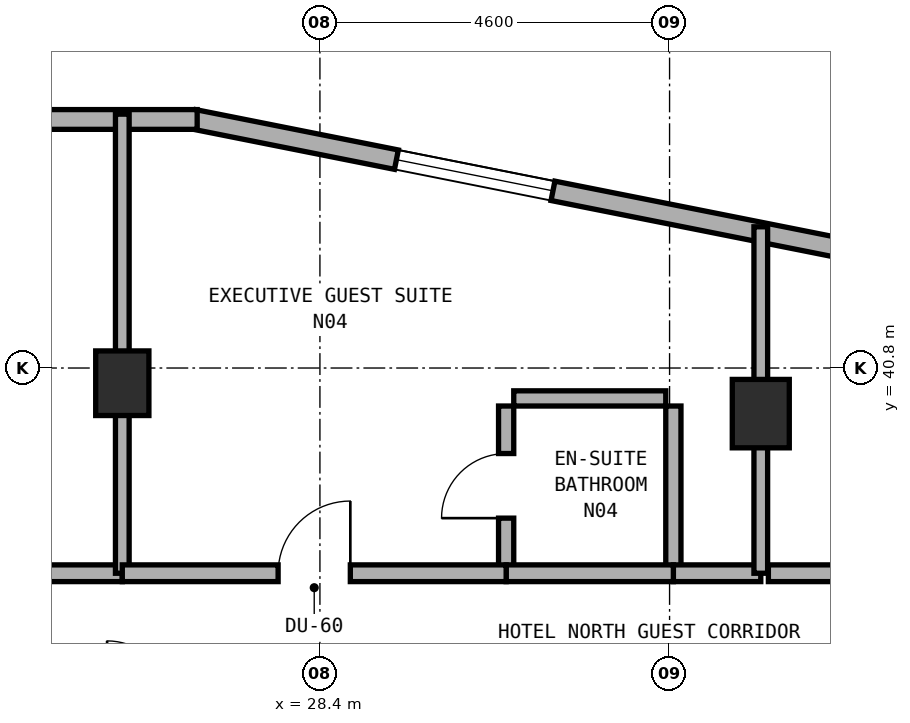
"""IFC4 building model, lengths in metres.
Left out: names, types, materials, properties, quantities, classifications, styles, units other than length and angle.
Written with IfcOpenShell. Run it as: python <this file> out.ifc"""

import sys

from ifc_helpers import new_model, si_unit, direction, frame, frame_2d, origin, origin_2d, place, context, subcontext, project, spatial, rectangle, extrude, element, fill, save


model = new_model("IFC4")
c1 = context("Model", 3, precision=1e-05, world=origin(), true_north=direction((0.0, 1.0)))
c2 = subcontext(c1, "Body", "Model", "MODEL_VIEW")
j1 = project(units=[si_unit("LENGTHUNIT", "METRE"), si_unit("PLANEANGLEUNIT", "RADIAN")], contexts=[c1])
p1 = place(None, origin())
s1 = spatial("IfcSite", under=j1, at=p1, CompositionType="ELEMENT")
p2 = place(p1, origin())
s2 = spatial("IfcBuilding", under=s1, at=p2, CompositionType="ELEMENT")
p3 = place(p2, frame((0.0, 0.0, 220.7)))
s3 = spatial("IfcBuildingStorey", under=s2, at=p3, CompositionType="ELEMENT", Elevation=220.7)
p4 = place(p3, frame((25.8, 40.6, 0.0), z_axis=(0.0, 0.0, 1.0), x_axis=(1.0, 0.0, 0.0)))
e1 = element("IfcColumn", 1, at=p4, inside=s3, PredefinedType="COLUMN", context=c2, shape_type="SweptSolid", body=[
    extrude(rectangle(XDim=0.7, YDim=0.85, at=origin_2d()), origin(), (0.0, 0.0, 1.0), 3.6),
])
p5 = place(p3, frame((34.2, 40.2, 0.0), z_axis=(0.0, 0.0, 1.0), x_axis=(1.0, 0.0, 0.0)))
e2 = element("IfcColumn", 2, at=p5, inside=s3, PredefinedType="COLUMN", context=c2, shape_type="SweptSolid", body=[
    extrude(rectangle(XDim=0.75, YDim=0.9, at=origin_2d()), origin(), (0.0, 0.0, 1.0), 3.6),
])
p6 = place(p3, frame((35.283, 42.371, 0.0), z_axis=(0.0, 0.0, 1.0), x_axis=(-0.980748582507, 0.1952747242, 0.0)))
e3 = element("IfcWall", 3, at=p6, inside=s3, PredefinedType="STANDARD", context=c2, shape_type="SweptSolid", body=[
    extrude(rectangle(XDim=8.705, YDim=0.26, at=frame_2d((4.353, 0.0))), origin(), (0.0, 0.0, 1.0), 3.32),
])
p7 = place(p6, frame((3.892, 0.0, 0.85)))
e4 = element("IfcOpeningElement", 4, at=p7, cuts=e3, PredefinedType="OPENING", context=c2, shape_type="SweptSolid", body=[
    extrude(rectangle(XDim=2.1, YDim=1.5, at=frame_2d((1.05, 0.75))), frame((0.0, 0.14, 0.0), z_axis=(0.0, -1.0, 0.0), x_axis=(1.0, 0.0, 0.0)), (0.0, 0.0, 1.0), 0.28),
])
p8 = place(p3, frame((26.785, 44.07, 0.0), z_axis=(0.0, 0.0, 1.0), x_axis=(-1.0, 0.0, 0.0)))
e5 = element("IfcWall", 5, at=p8, inside=s3, PredefinedType="STANDARD", context=c2, shape_type="SweptSolid", body=[
    extrude(rectangle(XDim=11.535, YDim=0.26, at=frame_2d((5.768, 0.0))), origin(), (0.0, 0.0, 1.0), 3.32),
])
p9 = place(p8, frame((5.185, 0.0, 0.0)))
e6 = element("IfcOpeningElement", 6, at=p9, cuts=e5, PredefinedType="OPENING", context=c2, shape_type="SweptSolid", body=[
    extrude(rectangle(XDim=1.2, YDim=2.15, at=frame_2d((0.6, 1.075))), frame((0.0, 0.14, 0.0), z_axis=(0.0, -1.0, 0.0), x_axis=(1.0, 0.0, 0.0)), (0.0, 0.0, 1.0), 0.28),
])
p10 = place(p8, frame((1.96, 0.0, 0.85)))
e7 = element("IfcOpeningElement", 7, at=p10, cuts=e5, PredefinedType="OPENING", context=c2, shape_type="SweptSolid", body=[
    extrude(rectangle(XDim=2.1, YDim=1.5, at=frame_2d((1.05, 0.75))), frame((0.0, 0.14, 0.0), z_axis=(0.0, -1.0, 0.0), x_axis=(1.0, 0.0, 0.0)), (0.0, 0.0, 1.0), 0.28),
])
p11 = place(p8, frame((7.51, 0.0, 0.85)))
e8 = element("IfcOpeningElement", 8, at=p11, cuts=e5, PredefinedType="OPENING", context=c2, shape_type="SweptSolid", body=[
    extrude(rectangle(XDim=2.1, YDim=1.5, at=frame_2d((1.05, 0.75))), frame((0.0, 0.14, 0.0), z_axis=(0.0, -1.0, 0.0), x_axis=(1.0, 0.0, 0.0)), (0.0, 0.0, 1.0), 0.28),
])
p12 = place(p3, frame((18.4, 38.1, 0.0), z_axis=(0.0, 0.0, 1.0), x_axis=(1.0, 0.0, 0.0)))
e9 = element("IfcWall", 9, at=p12, inside=s3, PredefinedType="SOLIDWALL", context=c2, shape_type="SweptSolid", body=[
    extrude(rectangle(XDim=7.4, YDim=0.22, at=frame_2d((3.7, 0.0))), origin(), (0.0, 0.0, 1.0), 2.695),
])
p13 = place(p12, frame((3.225, 0.0, 0.0)))
e10 = element("IfcOpeningElement", 10, at=p13, cuts=e9, PredefinedType="OPENING", context=c2, shape_type="SweptSolid", body=[
    extrude(rectangle(XDim=0.95, YDim=2.1, at=frame_2d((0.475, 1.05))), frame((0.0, 0.12, 0.0), z_axis=(0.0, -1.0, 0.0), x_axis=(1.0, 0.0, 0.0)), (0.0, 0.0, 1.0), 0.24),
])
p14 = place(p3, frame((25.8, 38.1, 0.0), z_axis=(0.0, 0.0, 1.0), x_axis=(0.0, 1.0, 0.0)))
e11 = element("IfcWall", 11, at=p14, inside=s3, PredefinedType="SOLIDWALL", context=c2, shape_type="SweptSolid", body=[
    extrude(rectangle(XDim=6.04, YDim=0.18, at=frame_2d((3.02, 0.0))), origin(), (0.0, 0.0, 1.0), 2.695),
])
p15 = place(p3, frame((30.85, 38.2, 0.0), z_axis=(0.0, 0.0, 1.0), x_axis=(0.0, 1.0, 0.0)))
e12 = element("IfcWall", 12, at=p15, inside=s3, PredefinedType="PLUMBINGWALL", context=c2, shape_type="SweptSolid", body=[
    extrude(rectangle(XDim=2.1, YDim=0.2, at=frame_2d((1.05, 0.0))), origin(), (0.0, 0.0, 1.0), 3.015),
])
p16 = place(p15, frame((0.625, 0.0, 0.0)))
e13 = element("IfcOpeningElement", 13, at=p16, cuts=e12, PredefinedType="OPENING", context=c2, shape_type="SweptSolid", body=[
    extrude(rectangle(XDim=0.85, YDim=2.1, at=frame_2d((0.425, 1.05))), frame((0.0, 0.11, 0.0), z_axis=(0.0, -1.0, 0.0), x_axis=(1.0, 0.0, 0.0)), (0.0, 0.0, 1.0), 0.22),
])
p17 = place(p3, frame((30.95, 40.4, 0.0), z_axis=(0.0, 0.0, 1.0), x_axis=(1.0, 0.0, 0.0)))
e14 = element("IfcWall", 14, at=p17, inside=s3, PredefinedType="PLUMBINGWALL", context=c2, shape_type="SweptSolid", body=[
    extrude(rectangle(XDim=2.0, YDim=0.2, at=frame_2d((1.0, 0.0))), origin(), (0.0, 0.0, 1.0), 3.015),
])
p18 = place(p3, frame((33.05, 38.2, 0.0), z_axis=(0.0, 0.0, 1.0), x_axis=(0.0, 1.0, 0.0)))
e15 = element("IfcWall", 15, at=p18, inside=s3, PredefinedType="PLUMBINGWALL", context=c2, shape_type="SweptSolid", body=[
    extrude(rectangle(XDim=2.1, YDim=0.2, at=frame_2d((1.05, 0.0))), origin(), (0.0, 0.0, 1.0), 3.015),
])
p19 = place(p3, frame((33.05, 38.1, 0.0), z_axis=(0.0, 0.0, 1.0), x_axis=(1.0, 0.0, 0.0)))
e16 = element("IfcWall", 16, at=p19, inside=s3, PredefinedType="SOLIDWALL", context=c2, shape_type="SweptSolid", body=[
    extrude(rectangle(XDim=1.15, YDim=0.22, at=frame_2d((0.575, 0.0))), origin(), (0.0, 0.0, 1.0), 2.695),
])
p20 = place(p3, frame((30.85, 38.1, 0.0), z_axis=(0.0, 0.0, 1.0), x_axis=(1.0, 0.0, 0.0)))
e17 = element("IfcWall", 17, at=p20, inside=s3, PredefinedType="SOLIDWALL", context=c2, shape_type="SweptSolid", body=[
    extrude(rectangle(XDim=2.2, YDim=0.22, at=frame_2d((1.1, 0.0))), origin(), (0.0, 0.0, 1.0), 3.32),
])
p21 = place(p3, frame((25.8, 38.1, 0.0), z_axis=(0.0, 0.0, 1.0), x_axis=(1.0, 0.0, 0.0)))
e18 = element("IfcWall", 18, at=p21, inside=s3, PredefinedType="SOLIDWALL", context=c2, shape_type="SweptSolid", body=[
    extrude(rectangle(XDim=5.05, YDim=0.22, at=frame_2d((2.525, 0.0))), origin(), (0.0, 0.0, 1.0), 2.695),
])
p22 = place(p21, frame((2.05, 0.0, 0.0)))
e19 = element("IfcOpeningElement", 19, at=p22, cuts=e18, PredefinedType="OPENING", context=c2, shape_type="SweptSolid", body=[
    extrude(rectangle(XDim=0.95, YDim=2.1, at=frame_2d((0.475, 1.05))), frame((0.0, 0.12, 0.0), z_axis=(0.0, -1.0, 0.0), x_axis=(1.0, 0.0, 0.0)), (0.0, 0.0, 1.0), 0.24),
])
p23 = place(p3, frame((34.2, 38.1, 0.0), z_axis=(0.0, 0.0, 1.0), x_axis=(0.0, 1.0, 0.0)))
e20 = element("IfcWall", 20, at=p23, inside=s3, PredefinedType="SOLIDWALL", context=c2, shape_type="SweptSolid", body=[
    extrude(rectangle(XDim=4.558, YDim=0.18, at=frame_2d((2.279, 0.0))), origin(), (0.0, 0.0, 1.0), 2.695),
])
p24 = place(p3, frame((34.3, 38.1, 0.0), z_axis=(0.0, 0.0, 1.0), x_axis=(1.0, 0.0, 0.0)))
e21 = element("IfcWall", 21, at=p24, inside=s3, PredefinedType="SOLIDWALL", context=c2, shape_type="SweptSolid", body=[
    extrude(rectangle(XDim=5.64, YDim=0.22, at=frame_2d((2.82, 0.0))), origin(), (0.0, 0.0, 1.0), 3.015),
])
p25 = place(p24, frame((2.1, 0.0, 0.0)))
e22 = element("IfcOpeningElement", 22, at=p25, cuts=e21, PredefinedType="OPENING", context=c2, shape_type="SweptSolid", body=[
    extrude(rectangle(XDim=0.95, YDim=2.1, at=frame_2d((0.475, 1.05))), frame((0.0, 0.12, 0.0), z_axis=(0.0, -1.0, 0.0), x_axis=(1.0, 0.0, 0.0)), (0.0, 0.0, 1.0), 0.24),
])
p26 = place(p7, origin())
e23 = element("IfcWindow", 23, at=p26, inside=s3, PartitioningType="SINGLE_PANEL", PredefinedType="WINDOW", context=c2, shape_type="SweptSolid", body=[
    extrude(rectangle(XDim=2.1, YDim=1.5, at=frame_2d((1.05, 0.75))), frame((0.0, 0.03, 0.0), z_axis=(0.0, -1.0, 0.0), x_axis=(1.0, 0.0, 0.0)), (0.0, 0.0, 1.0), 0.06),
])
fill(e4, e23)
p27 = place(p16, origin())
e24 = element("IfcDoor", 24, at=p27, inside=s3, OperationType="SINGLE_SWING_LEFT", PredefinedType="DOOR", context=c2, shape_type="SweptSolid", body=[
    extrude(rectangle(XDim=0.85, YDim=2.1, at=frame_2d((0.425, 1.05))), frame((0.0, 0.025, 0.0), z_axis=(0.0, -1.0, 0.0), x_axis=(1.0, 0.0, 0.0)), (0.0, 0.0, 1.0), 0.05),
])
fill(e13, e24)
p28 = place(p22, origin())
e25 = element("IfcDoor", 25, at=p28, inside=s3, OperationType="SINGLE_SWING_RIGHT", PredefinedType="DOOR", context=c2, shape_type="SweptSolid", body=[
    extrude(rectangle(XDim=0.95, YDim=2.1, at=frame_2d((0.475, 1.05))), frame((0.0, 0.025, 0.0), z_axis=(0.0, -1.0, 0.0), x_axis=(1.0, 0.0, 0.0)), (0.0, 0.0, 1.0), 0.05),
])
fill(e19, e25)
save(model, sys.argv[1])
